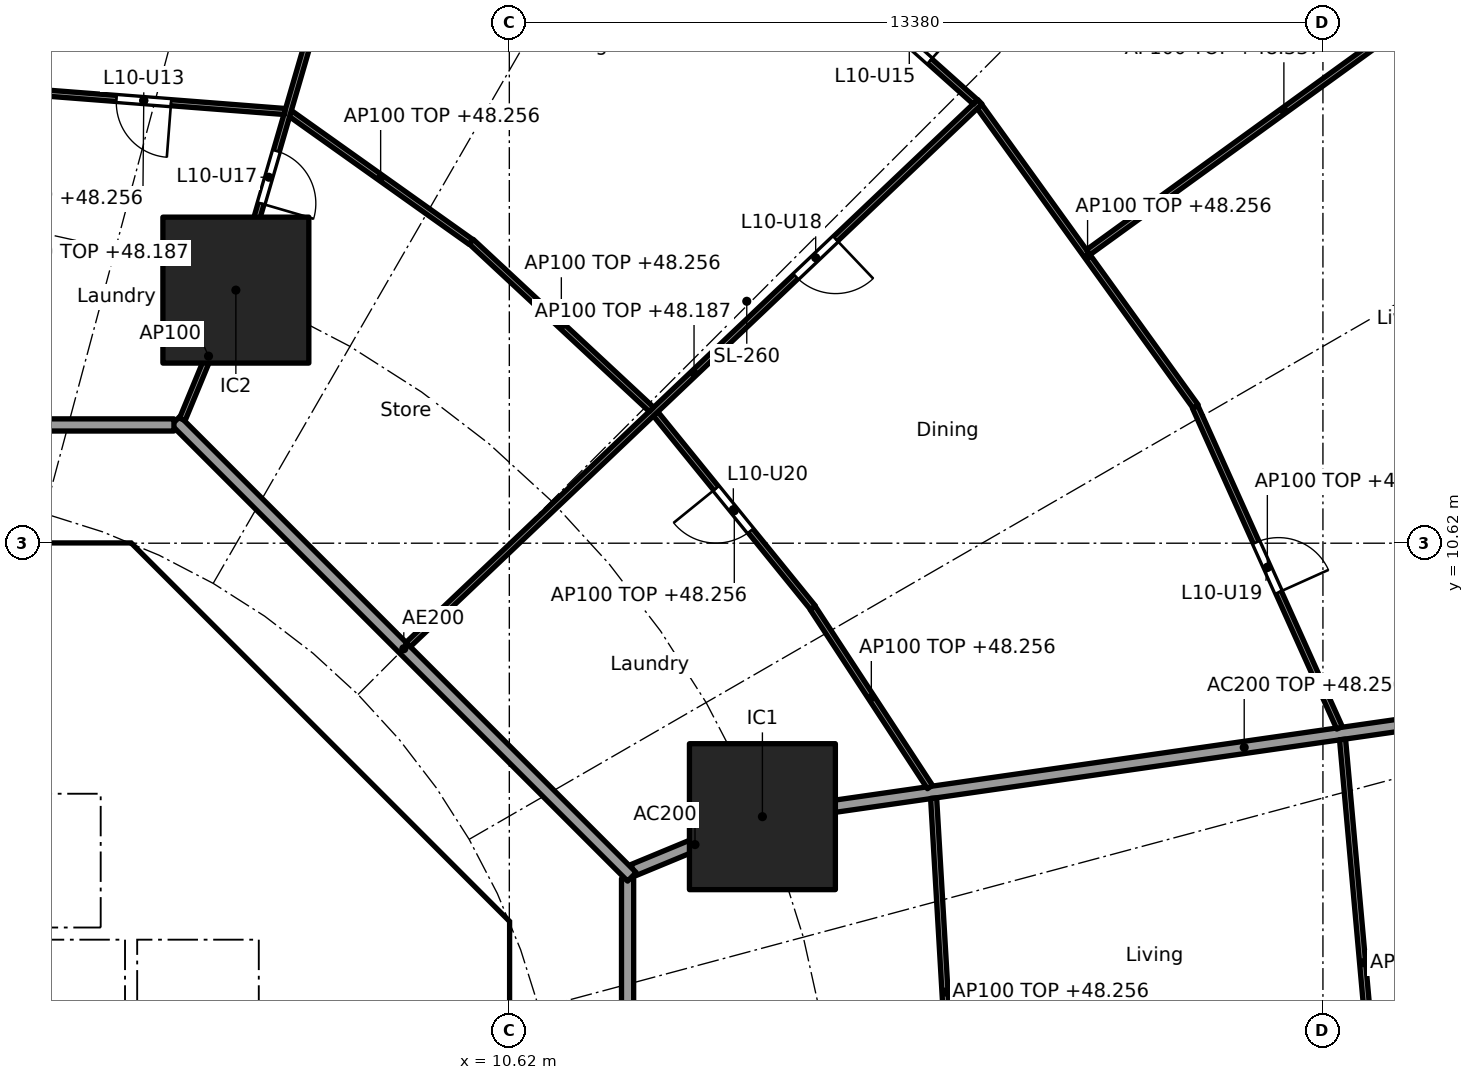
"""IFC4 building model, lengths in metres.
Left out: names, types, materials, properties, quantities, classifications, styles, units other than length and angle.
Written with IfcOpenShell. Run it as: python <this file> out.ifc"""

import sys

from ifc_helpers import new_model, si_unit, direction, frame, frame_2d, origin, origin_2d, place, context, subcontext, project, spatial, polyline, rectangle, outline, extrude, element, fill, save


model = new_model("IFC4")
c1 = context("Model", 3, precision=1e-05, world=origin(), true_north=direction((0.0, 1.0)))
c2 = subcontext(c1, "Body", "Model", "MODEL_VIEW")
j1 = project(units=[si_unit("LENGTHUNIT", "METRE"), si_unit("PLANEANGLEUNIT", "RADIAN")], contexts=[c1])
p1 = place(None, origin())
s1 = spatial("IfcSite", under=j1, at=p1, CompositionType="ELEMENT")
p2 = place(p1, origin())
s2 = spatial("IfcBuilding", under=s1, at=p2, CompositionType="ELEMENT")
p3 = place(p2, frame((0.0, 0.0, 45.5)))
s3 = spatial("IfcBuildingStorey", under=s2, at=p3, CompositionType="ELEMENT", Elevation=45.5)
for number, where, z_axis, x_axis in (
    (1, (14.782, 6.123, 0.0), (0.0, 0.0, 1.0), (1.0, 0.0, 0.0)),
    (2, (6.123, 14.782, 0.0), (0.0, 0.0, 1.0), (1.0, 0.0, 0.0)),
):
    element("IfcColumn", number, at=place(p3, frame(where, z_axis=z_axis, x_axis=x_axis)), inside=s3, PredefinedType="COLUMN", context=c2, shape_type="SweptSolid", body=[
        extrude(rectangle(XDim=2.4, YDim=2.4, at=origin_2d()), origin(), (0.0, 0.0, 1.0), 3.7),
    ])
p4 = place(p3, frame((9.988, 4.613, 0.0), z_axis=(0.0, 0.0, 1.0), x_axis=(-0.707106781187, 0.707106781187, 0.0)))
e3 = element("IfcWall", 3, at=p4, inside=s3, PredefinedType="SHEAR", context=c2, shape_type="SweptSolid", body=[
    extrude(rectangle(XDim=7.602, YDim=0.6, at=frame_2d((3.801, 0.0))), origin(), (0.0, 0.0, 1.0), 3.44),
])
p5 = place(p4, frame((3.201, 0.0, 0.0)))
e4 = element("IfcOpeningElement", 4, at=p5, cuts=e3, PredefinedType="OPENING", context=c2, shape_type="SweptSolid", body=[
    extrude(rectangle(XDim=1.2, YDim=2.1, at=frame_2d((0.6, 1.05))), frame((0.0, 0.31, 0.0), z_axis=(0.0, -1.0, 0.0), x_axis=(1.0, 0.0, 0.0)), (0.0, 0.0, 1.0), 0.62),
])
p6 = place(p3, frame((4.0, 4.3, 0.0), z_axis=(0.0, 0.0, 1.0), x_axis=(0.0, 1.0, 0.0)))
e5 = element("IfcWall", 5, at=p6, inside=s3, PredefinedType="SOLIDWALL", context=c2, shape_type="SweptSolid", body=[
    extrude(rectangle(XDim=2.2, YDim=0.2, at=frame_2d((1.1, 0.0))), origin(), (0.0, 0.0, 1.0), 3.44),
])
p7 = place(p6, frame((0.55, 0.0, 0.0)))
e6 = element("IfcOpeningElement", 6, at=p7, cuts=e5, PredefinedType="OPENING", context=c2, shape_type="SweptSolid", body=[
    extrude(rectangle(XDim=1.1, YDim=2.1, at=frame_2d((0.55, 1.05))), frame((0.0, 0.11, 0.0), z_axis=(0.0, -1.0, 0.0), x_axis=(1.0, 0.0, 0.0)), (0.0, 0.0, 1.0), 0.22),
])
p8 = place(p3, frame((6.7, 4.0, 0.0), z_axis=(0.0, 0.0, 1.0), x_axis=(1.0, 0.0, 0.0)))
e7 = element("IfcWall", 7, at=p8, inside=s3, PredefinedType="SOLIDWALL", context=c2, shape_type="SweptSolid", body=[
    extrude(rectangle(XDim=3.325, YDim=0.2, at=frame_2d((1.662, 0.0))), origin(), (0.0, 0.0, 1.0), 3.44),
])
p9 = place(p8, frame((1.25, 0.0, 0.0)))
e8 = element("IfcOpeningElement", 8, at=p9, cuts=e7, PredefinedType="OPENING", context=c2, shape_type="SweptSolid", body=[
    extrude(rectangle(XDim=1.1, YDim=2.1, at=frame_2d((0.55, 1.05))), frame((0.0, 0.11, 0.0), z_axis=(0.0, -1.0, 0.0), x_axis=(1.0, 0.0, 0.0)), (0.0, 0.0, 1.0), 0.22),
])
p10 = place(p3, frame((4.0, 7.025, 0.0), z_axis=(0.0, 0.0, 1.0), x_axis=(0.0, 1.0, 0.0)))
e9 = element("IfcWall", 9, at=p10, inside=s3, PredefinedType="SOLIDWALL", context=c2, shape_type="SweptSolid", body=[
    extrude(rectangle(XDim=3.0, YDim=0.2, at=frame_2d((1.5, 0.0))), origin(), (0.0, 0.0, 1.0), 3.44),
])
p11 = place(p10, frame((0.925, 0.0, 0.0)))
e10 = element("IfcOpeningElement", 10, at=p11, cuts=e9, PredefinedType="OPENING", context=c2, shape_type="SweptSolid", body=[
    extrude(rectangle(XDim=1.1, YDim=2.1, at=frame_2d((0.55, 1.05))), frame((0.0, 0.11, 0.0), z_axis=(0.0, -1.0, 0.0), x_axis=(1.0, 0.0, 0.0)), (0.0, 0.0, 1.0), 0.22),
])
p12 = place(p3, origin())
e11 = element("IfcWall", 11, at=p12, inside=s3, PredefinedType="SHEAR", context=c2, shape_type="SweptSolid", body=[
    extrude(outline(polyline([(-4.152, 10.025), (-4.401, 9.776), (-4.825, 10.2), (-4.401, 10.625), (4.401, 10.625), (4.825, 10.2), (4.401, 9.776), (4.152, 10.025), (-4.152, 10.025)])), origin(), (0.0, 0.0, 1.0), 3.44),
])
p13 = place(p3, origin())
e12 = element("IfcWall", 12, at=p13, inside=s3, PredefinedType="SHEAR", context=c2, shape_type="SweptSolid", body=[
    extrude(outline(polyline([(9.776, -4.401), (10.025, -4.152), (10.025, -3.801), (10.025, 4.152), (9.776, 4.401), (10.2, 4.825), (10.625, 4.401), (10.625, -4.401), (10.2, -4.825), (9.776, -4.401)])), origin(), (0.0, 0.0, 1.0), 3.44),
])
p14 = place(p3, origin())
e13 = element("IfcWall", 13, at=p14, inside=s3, PredefinedType="SOLIDWALL", context=c2, shape_type="SweptSolid", body=[
    extrude(outline(polyline([(-6.5, 2.1), (-6.7, 2.1), (-6.7, 4.3), (6.7, 4.3), (6.7, 2.1), (6.5, 2.1), (6.5, 4.1), (4.5, 4.1), (4.5, 2.1), (4.3, 2.1), (4.3, 4.1), (2.3, 4.1), (2.3, 2.1), (2.1, 2.1), (2.1, 4.1), (0.1, 4.1), (0.1, 2.1), (-0.1, 2.1), (-0.1, 4.1), (-2.1, 4.1), (-2.1, 2.1), (-2.3, 2.1), (-2.3, 4.1), (-4.3, 4.1), (-4.3, 2.1), (-4.5, 2.1), (-4.5, 4.1), (-6.5, 4.1), (-6.5, 2.1)])), origin(), (0.0, 0.0, 1.0), 3.44),
])
p15 = place(p3, origin())
e14 = element("IfcWall", 14, at=p15, inside=s3, PredefinedType="SOLIDWALL", context=c2, shape_type="SweptSolid", body=[
    extrude(outline(polyline([(4.1, 6.5), (-4.1, 6.5), (-4.1, 7.025), (4.1, 7.025), (4.1, 6.5)])), origin(), (0.0, 0.0, 1.0), 3.44),
])
p16 = place(p3, origin())
e15 = element("IfcWall", 15, at=p16, inside=s3, PredefinedType="SOLIDWALL", context=c2, shape_type="SweptSolid", body=[
    extrude(outline(polyline([(7.025, -3.9), (6.7, -3.9), (6.7, 3.9), (7.025, 3.9), (7.025, -3.9)])), origin(), (0.0, 0.0, 1.0), 3.44),
])
p17 = place(p3, frame((12.657, 5.243, 0.0), z_axis=(0.0, 0.0, 1.0), x_axis=(0.923853160736, 0.382747093259, 0.0)))
e16 = element("IfcWall", 16, at=p17, inside=s3, PredefinedType="PARTITIONING", context=c2, shape_type="SweptSolid", body=[
    extrude(rectangle(XDim=2.2, YDim=0.2, at=frame_2d((1.1, 0.0))), origin(), (0.0, 0.0, 1.0), 3.44),
])
p18 = place(p3, frame((14.832, 6.13, 0.0), z_axis=(0.0, 0.0, 1.0), x_axis=(0.989836541293, 0.142209779978, 0.0)))
e17 = element("IfcWall", 17, at=p18, inside=s3, PredefinedType="PARTITIONING", context=c2, shape_type="SweptSolid", body=[
    extrude(rectangle(XDim=15.909, YDim=0.2, at=frame_2d((7.955, 0.0))), origin(), (0.0, 0.0, 1.0), 2.756),
])
p19 = place(p3, frame((12.565, -5.104, 0.0), z_axis=(0.0, 0.0, 1.0), x_axis=(0.0, 1.0, 0.0)))
e18 = element("IfcWall", 18, at=p19, inside=s3, PredefinedType="PARTITIONING", context=c2, shape_type="SweptSolid", body=[
    extrude(rectangle(XDim=10.209, YDim=0.2, at=frame_2d((5.104, 0.0))), origin(), (0.0, 0.0, 1.0), 3.44),
])
p20 = place(p3, frame((12.635, 5.134, 0.0), z_axis=(0.0, 0.0, 1.0), x_axis=(-0.707106781187, 0.707106781187, 0.0)))
e19 = element("IfcWall", 19, at=p20, inside=s3, PredefinedType="PARTITIONING", context=c2, shape_type="SweptSolid", body=[
    extrude(rectangle(XDim=10.609, YDim=0.2, at=frame_2d((5.305, 0.0))), origin(), (0.0, 0.0, 1.0), 3.44),
])
p21 = place(p3, frame((5.104, 12.565, 0.0), z_axis=(0.0, 0.0, 1.0), x_axis=(-1.0, 0.0, 0.0)))
e20 = element("IfcWall", 20, at=p21, inside=s3, PredefinedType="PARTITIONING", context=c2, shape_type="SweptSolid", body=[
    extrude(rectangle(XDim=10.409, YDim=0.2, at=frame_2d((5.205, 0.0))), origin(), (0.0, 0.0, 1.0), 3.44),
])
p22 = place(p3, frame((17.971, 0.05, 0.0), z_axis=(0.0, 0.0, 1.0), x_axis=(-0.058513659907, 0.998286607946, 0.0)))
e21 = element("IfcWall", 21, at=p22, inside=s3, PredefinedType="PARTITIONING", context=c2, shape_type="SweptSolid", body=[
    extrude(rectangle(XDim=6.388, YDim=0.1, at=frame_2d((3.194, 0.0))), origin(), (0.0, 0.0, 1.0), 2.756),
])
p23 = place(p3, frame((24.982, 0.05, 0.0), z_axis=(0.0, 0.0, 1.0), x_axis=(-0.08944290521, 0.995991951126, 0.0)))
e22 = element("IfcWall", 22, at=p23, inside=s3, PredefinedType="PARTITIONING", context=c2, shape_type="SweptSolid", body=[
    extrude(rectangle(XDim=7.373, YDim=0.1, at=frame_2d((3.686, 0.0))), origin(), (0.0, 0.0, 1.0), 2.756),
])
p24 = place(p3, frame((17.537, 6.61, 0.0), z_axis=(0.0, 0.0, 1.0), x_axis=(-0.547637987196, 0.836715384692, 0.0)))
e23 = element("IfcWall", 23, at=p24, inside=s3, PredefinedType="PARTITIONING", context=c2, shape_type="SweptSolid", body=[
    extrude(rectangle(XDim=3.52, YDim=0.1, at=frame_2d((1.76, 0.0))), origin(), (0.0, 0.0, 1.0), 2.756),
])
p25 = place(p3, frame((24.273, 7.584, 0.0), z_axis=(0.0, 0.0, 1.0), x_axis=(-0.410201529109, 0.911994904326, 0.0)))
e24 = element("IfcWall", 24, at=p25, inside=s3, PredefinedType="PARTITIONING", context=c2, shape_type="SweptSolid", body=[
    extrude(rectangle(XDim=5.787, YDim=0.1, at=frame_2d((2.894, 0.0))), origin(), (0.0, 0.0, 1.0), 2.756),
])
p26 = place(p25, frame((2.444, 0.0, 0.0)))
e25 = element("IfcOpeningElement", 25, at=p26, cuts=e24, PredefinedType="OPENING", context=c2, shape_type="SweptSolid", body=[
    extrude(rectangle(XDim=0.9, YDim=2.1, at=frame_2d((0.45, 1.05))), frame((0.0, 0.06, 0.0), z_axis=(0.0, -1.0, 0.0), x_axis=(1.0, 0.0, 0.0)), (0.0, 0.0, 1.0), 0.12),
])
p27 = place(p3, frame((15.614, 9.559, 0.0), z_axis=(0.0, 0.0, 1.0), x_axis=(-0.63012473344, 0.776493928056, 0.0)))
e26 = element("IfcWall", 26, at=p27, inside=s3, PredefinedType="PARTITIONING", context=c2, shape_type="SweptSolid", body=[
    extrude(rectangle(XDim=4.106, YDim=0.1, at=frame_2d((2.053, 0.0))), origin(), (0.0, 0.0, 1.0), 2.756),
])
p28 = place(p27, frame((1.628, 0.0, 0.0)))
e27 = element("IfcOpeningElement", 27, at=p28, cuts=e26, PredefinedType="OPENING", context=c2, shape_type="SweptSolid", body=[
    extrude(rectangle(XDim=0.9, YDim=2.1, at=frame_2d((0.45, 1.05))), frame((0.0, 0.06, 0.0), z_axis=(0.0, -1.0, 0.0), x_axis=(1.0, 0.0, 0.0)), (0.0, 0.0, 1.0), 0.12),
])
p29 = place(p3, frame((21.908, 12.866, 0.0), z_axis=(0.0, 0.0, 1.0), x_axis=(-0.584558392935, 0.811351640936, 0.0)))
e28 = element("IfcWall", 28, at=p29, inside=s3, PredefinedType="PARTITIONING", context=c2, shape_type="SweptSolid", body=[
    extrude(rectangle(XDim=6.084, YDim=0.1, at=frame_2d((3.042, 0.0))), origin(), (0.0, 0.0, 1.0), 2.756),
])
p30 = place(p3, frame((20.141, 15.405, 0.0), z_axis=(0.0, 0.0, 1.0), x_axis=(0.809834895779, 0.58665785734, 0.0)))
e29 = element("IfcWall", 29, at=p30, inside=s3, PredefinedType="PARTITIONING", context=c2, shape_type="SweptSolid", body=[
    extrude(rectangle(XDim=7.945, YDim=0.1, at=frame_2d((3.973, 0.0))), origin(), (0.0, 0.0, 1.0), 2.837),
])
p31 = place(p3, frame((8.957, 8.953, 0.0), z_axis=(0.0, 0.0, 1.0), x_axis=(0.725250022034, 0.688485588476, 0.0)))
e30 = element("IfcWall", 30, at=p31, inside=s3, PredefinedType="PARTITIONING", context=c2, shape_type="SweptSolid", body=[
    extrude(rectangle(XDim=12.963, YDim=0.1, at=frame_2d((6.481, 0.0))), origin(), (0.0, 0.0, 1.0), 2.687),
])
p32 = place(p31, frame((8.79, 0.0, 0.0)))
e31 = element("IfcOpeningElement", 31, at=p32, cuts=e30, PredefinedType="OPENING", context=c2, shape_type="SweptSolid", body=[
    extrude(rectangle(XDim=0.9, YDim=2.1, at=frame_2d((0.45, 1.05))), frame((0.0, 0.06, 0.0), z_axis=(0.0, -1.0, 0.0), x_axis=(1.0, 0.0, 0.0)), (0.0, 0.0, 1.0), 0.12),
])
p33 = place(p3, frame((12.958, 12.82, 0.0), z_axis=(0.0, 0.0, 1.0), x_axis=(-0.732028724098, 0.681273768096, 0.0)))
e32 = element("IfcWall", 32, at=p33, inside=s3, PredefinedType="PARTITIONING", context=c2, shape_type="SweptSolid", body=[
    extrude(rectangle(XDim=4.05, YDim=0.1, at=frame_2d((2.025, 0.0))), origin(), (0.0, 0.0, 1.0), 2.756),
])
p34 = place(p3, frame((18.285, 17.877, 0.0), z_axis=(0.0, 0.0, 1.0), x_axis=(-0.745812746724, 0.666155647596, 0.0)))
e33 = element("IfcWall", 33, at=p34, inside=s3, PredefinedType="PARTITIONING", context=c2, shape_type="SweptSolid", body=[
    extrude(rectangle(XDim=5.931, YDim=0.1, at=frame_2d((2.965, 0.0))), origin(), (0.0, 0.0, 1.0), 2.756),
])
p35 = place(p34, frame((1.008, 0.0, 0.0)))
e34 = element("IfcOpeningElement", 34, at=p35, cuts=e33, PredefinedType="OPENING", context=c2, shape_type="SweptSolid", body=[
    extrude(rectangle(XDim=0.9, YDim=2.1, at=frame_2d((0.45, 1.05))), frame((0.0, 0.06, 0.0), z_axis=(0.0, -1.0, 0.0), x_axis=(1.0, 0.0, 0.0)), (0.0, 0.0, 1.0), 0.12),
])
p36 = place(p3, frame((9.989, 15.574, 0.0), z_axis=(0.0, 0.0, 1.0), x_axis=(-0.81494477814, 0.57953861699, 0.0)))
e35 = element("IfcWall", 35, at=p36, inside=s3, PredefinedType="PARTITIONING", context=c2, shape_type="SweptSolid", body=[
    extrude(rectangle(XDim=3.644, YDim=0.1, at=frame_2d((1.822, 0.0))), origin(), (0.0, 0.0, 1.0), 2.756),
])
p37 = place(p3, frame((5.243, 12.657, 0.0), z_axis=(0.0, 0.0, 1.0), x_axis=(0.382719158442, 0.923864733477, 0.0)))
e36 = element("IfcWall", 36, at=p37, inside=s3, PredefinedType="PARTITIONING", context=c2, shape_type="SweptSolid", body=[
    extrude(rectangle(XDim=2.25, YDim=0.1, at=frame_2d((1.125, 0.0))), origin(), (0.0, 0.0, 1.0), 3.44),
])
p38 = place(p3, frame((6.137, 14.83, 0.0), z_axis=(0.0, 0.0, 1.0), x_axis=(0.27985745069, 0.960041565399, 0.0)))
e37 = element("IfcWall", 37, at=p38, inside=s3, PredefinedType="PARTITIONING", context=c2, shape_type="SweptSolid", body=[
    extrude(rectangle(XDim=16.705, YDim=0.1, at=frame_2d((8.353, 0.0))), origin(), (0.0, 0.0, 1.0), 2.756),
])
p39 = place(p38, frame((6.091, 0.0, 0.0)))
e38 = element("IfcOpeningElement", 38, at=p39, cuts=e37, PredefinedType="OPENING", context=c2, shape_type="SweptSolid", body=[
    extrude(rectangle(XDim=0.9, YDim=2.1, at=frame_2d((0.45, 1.05))), frame((0.0, 0.06, 0.0), z_axis=(0.0, -1.0, 0.0), x_axis=(1.0, 0.0, 0.0)), (0.0, 0.0, 1.0), 0.12),
])
p40 = place(p38, frame((1.434, 0.0, 0.0)))
e39 = element("IfcOpeningElement", 39, at=p40, cuts=e37, PredefinedType="OPENING", context=c2, shape_type="SweptSolid", body=[
    extrude(rectangle(XDim=0.9, YDim=2.1, at=frame_2d((0.45, 1.05))), frame((0.0, 0.06, 0.0), z_axis=(0.0, -1.0, 0.0), x_axis=(1.0, 0.0, 0.0)), (0.0, 0.0, 1.0), 0.12),
])
p41 = place(p3, frame((6.928, 17.719, 0.0), z_axis=(0.0, 0.0, 1.0), x_axis=(-0.997017959142, 0.077169872028, 0.0)))
e40 = element("IfcWall", 40, at=p41, inside=s3, PredefinedType="PARTITIONING", context=c2, shape_type="SweptSolid", body=[
    extrude(rectangle(XDim=4.654, YDim=0.1, at=frame_2d((2.327, 0.0))), origin(), (0.0, 0.0, 1.0), 2.756),
])
p42 = place(p41, frame((1.877, 0.0, 0.0)))
e41 = element("IfcOpeningElement", 41, at=p42, cuts=e40, PredefinedType="OPENING", context=c2, shape_type="SweptSolid", body=[
    extrude(rectangle(XDim=0.9, YDim=2.1, at=frame_2d((0.45, 1.05))), frame((0.0, 0.06, 0.0), z_axis=(0.0, -1.0, 0.0), x_axis=(1.0, 0.0, 0.0)), (0.0, 0.0, 1.0), 0.12),
])
p43 = place(p7, origin())
e42 = element("IfcDoor", 42, at=p43, inside=s3, OperationType="DOUBLE_DOOR_SLIDING", PredefinedType="DOOR", context=c2, shape_type="SweptSolid", body=[
    extrude(rectangle(XDim=1.1, YDim=2.1, at=frame_2d((0.55, 1.05))), frame((0.0, 0.025, 0.0), z_axis=(0.0, -1.0, 0.0), x_axis=(1.0, 0.0, 0.0)), (0.0, 0.0, 1.0), 0.05),
])
fill(e6, e42)
p44 = place(p9, frame((1.1, 0.0, 0.0), x_axis=(-1.0, 0.0, 0.0)))
e43 = element("IfcDoor", 43, at=p44, inside=s3, OperationType="SINGLE_SWING_RIGHT", PredefinedType="DOOR", context=c2, shape_type="SweptSolid", body=[
    extrude(rectangle(XDim=1.1, YDim=2.1, at=frame_2d((0.55, 1.05))), frame((0.0, 0.025, 0.0), z_axis=(0.0, -1.0, 0.0), x_axis=(1.0, 0.0, 0.0)), (0.0, 0.0, 1.0), 0.05),
])
fill(e8, e43)
p45 = place(p11, origin())
e44 = element("IfcDoor", 44, at=p45, inside=s3, OperationType="SINGLE_SWING_LEFT", PredefinedType="DOOR", context=c2, shape_type="SweptSolid", body=[
    extrude(rectangle(XDim=1.1, YDim=2.1, at=frame_2d((0.55, 1.05))), frame((0.0, 0.025, 0.0), z_axis=(0.0, -1.0, 0.0), x_axis=(1.0, 0.0, 0.0)), (0.0, 0.0, 1.0), 0.05),
])
fill(e10, e44)
p46 = place(p5, origin())
e45 = element("IfcDoor", 45, at=p46, inside=s3, OperationType="SINGLE_SWING_RIGHT", PredefinedType="DOOR", context=c2, shape_type="SweptSolid", body=[
    extrude(rectangle(XDim=1.2, YDim=2.1, at=frame_2d((0.6, 1.05))), frame((0.0, 0.025, 0.0), z_axis=(0.0, -1.0, 0.0), x_axis=(1.0, 0.0, 0.0)), (0.0, 0.0, 1.0), 0.05),
])
fill(e4, e45)
p47 = place(p42, origin())
e46 = element("IfcDoor", 46, at=p47, inside=s3, OperationType="SINGLE_SWING_LEFT", PredefinedType="DOOR", context=c2, shape_type="SweptSolid", body=[
    extrude(rectangle(XDim=0.9, YDim=2.1, at=frame_2d((0.45, 1.05))), frame((0.0, 0.025, 0.0), z_axis=(0.0, -1.0, 0.0), x_axis=(1.0, 0.0, 0.0)), (0.0, 0.0, 1.0), 0.05),
])
fill(e41, e46)
p48 = place(p35, frame((0.9, 0.0, 0.0), x_axis=(-1.0, 0.0, 0.0)))
e47 = element("IfcDoor", 47, at=p48, inside=s3, OperationType="SINGLE_SWING_RIGHT", PredefinedType="DOOR", context=c2, shape_type="SweptSolid", body=[
    extrude(rectangle(XDim=0.9, YDim=2.1, at=frame_2d((0.45, 1.05))), frame((0.0, 0.025, 0.0), z_axis=(0.0, -1.0, 0.0), x_axis=(1.0, 0.0, 0.0)), (0.0, 0.0, 1.0), 0.05),
])
fill(e34, e47)
p49 = place(p40, frame((0.9, 0.0, 0.0), x_axis=(-1.0, 0.0, 0.0)))
e48 = element("IfcDoor", 48, at=p49, inside=s3, OperationType="SINGLE_SWING_RIGHT", PredefinedType="DOOR", context=c2, shape_type="SweptSolid", body=[
    extrude(rectangle(XDim=0.9, YDim=2.1, at=frame_2d((0.45, 1.05))), frame((0.0, 0.025, 0.0), z_axis=(0.0, -1.0, 0.0), x_axis=(1.0, 0.0, 0.0)), (0.0, 0.0, 1.0), 0.05),
])
fill(e39, e48)
p50 = place(p32, frame((0.9, 0.0, 0.0), x_axis=(-1.0, 0.0, 0.0)))
e49 = element("IfcDoor", 49, at=p50, inside=s3, OperationType="SINGLE_SWING_LEFT", PredefinedType="DOOR", context=c2, shape_type="SweptSolid", body=[
    extrude(rectangle(XDim=0.9, YDim=2.1, at=frame_2d((0.45, 1.05))), frame((0.0, 0.025, 0.0), z_axis=(0.0, -1.0, 0.0), x_axis=(1.0, 0.0, 0.0)), (0.0, 0.0, 1.0), 0.05),
])
fill(e31, e49)
p51 = place(p26, frame((0.9, 0.0, 0.0), x_axis=(-1.0, 0.0, 0.0)))
e50 = element("IfcDoor", 50, at=p51, inside=s3, OperationType="SINGLE_SWING_RIGHT", PredefinedType="DOOR", context=c2, shape_type="SweptSolid", body=[
    extrude(rectangle(XDim=0.9, YDim=2.1, at=frame_2d((0.45, 1.05))), frame((0.0, 0.025, 0.0), z_axis=(0.0, -1.0, 0.0), x_axis=(1.0, 0.0, 0.0)), (0.0, 0.0, 1.0), 0.05),
])
fill(e25, e50)
p52 = place(p28, origin())
e51 = element("IfcDoor", 51, at=p52, inside=s3, OperationType="SINGLE_SWING_RIGHT", PredefinedType="DOOR", context=c2, shape_type="SweptSolid", body=[
    extrude(rectangle(XDim=0.9, YDim=2.1, at=frame_2d((0.45, 1.05))), frame((0.0, 0.025, 0.0), z_axis=(0.0, -1.0, 0.0), x_axis=(1.0, 0.0, 0.0)), (0.0, 0.0, 1.0), 0.05),
])
fill(e27, e51)
save(model, sys.argv[1])
